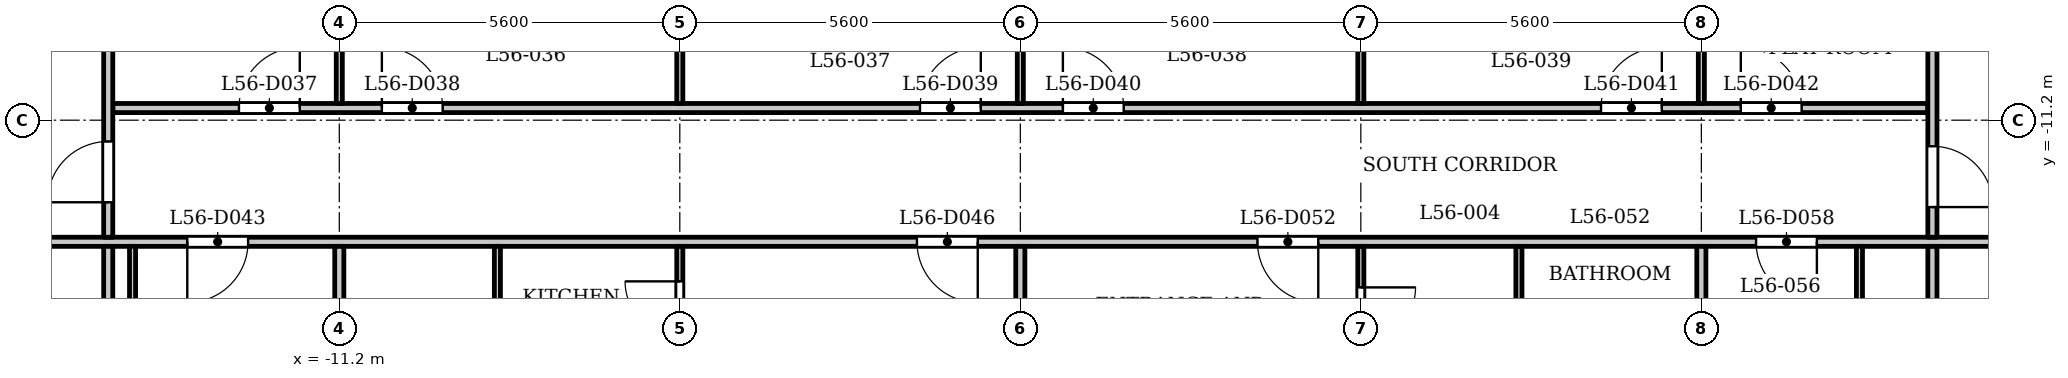
"""IFC4 building model, lengths in metres.
Left out: names, types, materials, properties, quantities, classifications, styles, units other than length and angle.
Written with IfcOpenShell. Run it as: python <this file> out.ifc"""

import sys

from ifc_helpers import new_model, si_unit, direction, frame, frame_2d, origin, place, context, subcontext, project, spatial, rectangle, extrude, element, fill, save


model = new_model("IFC4")
c1 = context("Model", 3, precision=1e-05, world=origin(), true_north=direction((0.0, 1.0)))
c2 = subcontext(c1, "Body", "Model", "MODEL_VIEW")
j1 = project(units=[si_unit("LENGTHUNIT", "METRE"), si_unit("PLANEANGLEUNIT", "RADIAN")], contexts=[c1])
p1 = place(None, origin())
s1 = spatial("IfcSite", under=j1, at=p1, CompositionType="ELEMENT")
p2 = place(p1, origin())
s2 = spatial("IfcBuilding", under=s1, at=p2, CompositionType="ELEMENT")
p3 = place(p2, frame((0.0, 0.0, 216.9)))
s3 = spatial("IfcBuildingStorey", under=s2, at=p3, CompositionType="ELEMENT", Elevation=216.9)
p4 = place(p3, frame((-17.4, -13.2, 0.0), z_axis=(0.0, 0.0, 1.0), x_axis=(1.0, 0.0, 0.0)))
e1 = element("IfcWall", 1, at=p4, inside=s3, PredefinedType="PARTITIONING", context=c2, shape_type="SweptSolid", body=[
    extrude(rectangle(XDim=34.8, YDim=0.15, at=frame_2d((17.4, 0.0))), origin(), (0.0, 0.0, 1.0), 3.2),
])
p5 = place(p4, frame((0.15, 0.0, 0.0)))
e2 = element("IfcOpeningElement", 2, at=p5, cuts=e1, PredefinedType="OPENING", context=c2, shape_type="SweptSolid", body=[
    extrude(rectangle(XDim=1.0, YDim=2.1, at=frame_2d((0.5, 1.05))), frame((0.0, 0.085, 0.0), z_axis=(0.0, -1.0, 0.0), x_axis=(1.0, 0.0, 0.0)), (0.0, 0.0, 1.0), 0.17),
])
p6 = place(p4, frame((33.55, 0.0, 0.0)))
e3 = element("IfcOpeningElement", 3, at=p6, cuts=e1, PredefinedType="OPENING", context=c2, shape_type="SweptSolid", body=[
    extrude(rectangle(XDim=1.0, YDim=2.1, at=frame_2d((0.5, 1.05))), frame((0.0, 0.085, 0.0), z_axis=(0.0, -1.0, 0.0), x_axis=(1.0, 0.0, 0.0)), (0.0, 0.0, 1.0), 0.17),
])
p7 = place(p4, frame((3.7, 0.0, 0.0)))
e4 = element("IfcOpeningElement", 4, at=p7, cuts=e1, PredefinedType="OPENING", context=c2, shape_type="SweptSolid", body=[
    extrude(rectangle(XDim=1.0, YDim=2.1, at=frame_2d((0.5, 1.05))), frame((0.0, 0.085, 0.0), z_axis=(0.0, -1.0, 0.0), x_axis=(1.0, 0.0, 0.0)), (0.0, 0.0, 1.0), 0.17),
])
p8 = place(p4, frame((15.7, 0.0, 0.0)))
e5 = element("IfcOpeningElement", 5, at=p8, cuts=e1, PredefinedType="OPENING", context=c2, shape_type="SweptSolid", body=[
    extrude(rectangle(XDim=1.0, YDim=2.1, at=frame_2d((0.5, 1.05))), frame((0.0, 0.085, 0.0), z_axis=(0.0, -1.0, 0.0), x_axis=(1.0, 0.0, 0.0)), (0.0, 0.0, 1.0), 0.17),
])
p9 = place(p4, frame((21.3, 0.0, 0.0)))
e6 = element("IfcOpeningElement", 6, at=p9, cuts=e1, PredefinedType="OPENING", context=c2, shape_type="SweptSolid", body=[
    extrude(rectangle(XDim=1.0, YDim=2.1, at=frame_2d((0.5, 1.05))), frame((0.0, 0.085, 0.0), z_axis=(0.0, -1.0, 0.0), x_axis=(1.0, 0.0, 0.0)), (0.0, 0.0, 1.0), 0.17),
])
p10 = place(p4, frame((29.5, 0.0, 0.0)))
e7 = element("IfcOpeningElement", 7, at=p10, cuts=e1, PredefinedType="OPENING", context=c2, shape_type="SweptSolid", body=[
    extrude(rectangle(XDim=1.0, YDim=2.1, at=frame_2d((0.5, 1.05))), frame((0.0, 0.085, 0.0), z_axis=(0.0, -1.0, 0.0), x_axis=(1.0, 0.0, 0.0)), (0.0, 0.0, 1.0), 0.17),
])
p11 = place(p3, frame((-14.925, -11.0, 0.0), z_axis=(0.0, 0.0, 1.0), x_axis=(1.0, 0.0, 0.0)))
e8 = element("IfcWall", 8, at=p11, inside=s3, PredefinedType="PARTITIONING", context=c2, shape_type="SweptSolid", body=[
    extrude(rectangle(XDim=29.85, YDim=0.15, at=frame_2d((14.925, 0.0))), origin(), (0.0, 0.0, 1.0), 3.2),
])
p12 = place(p11, frame((2.075, 0.0, 0.0)))
e9 = element("IfcOpeningElement", 9, at=p12, cuts=e8, PredefinedType="OPENING", context=c2, shape_type="SweptSolid", body=[
    extrude(rectangle(XDim=1.0, YDim=2.1, at=frame_2d((0.5, 1.05))), frame((0.0, 0.085, 0.0), z_axis=(0.0, -1.0, 0.0), x_axis=(1.0, 0.0, 0.0)), (0.0, 0.0, 1.0), 0.17),
])
p13 = place(p11, frame((4.425, 0.0, 0.0)))
e10 = element("IfcOpeningElement", 10, at=p13, cuts=e8, PredefinedType="OPENING", context=c2, shape_type="SweptSolid", body=[
    extrude(rectangle(XDim=1.0, YDim=2.1, at=frame_2d((0.5, 1.05))), frame((0.0, 0.085, 0.0), z_axis=(0.0, -1.0, 0.0), x_axis=(1.0, 0.0, 0.0)), (0.0, 0.0, 1.0), 0.17),
])
p14 = place(p11, frame((13.275, 0.0, 0.0)))
e11 = element("IfcOpeningElement", 11, at=p14, cuts=e8, PredefinedType="OPENING", context=c2, shape_type="SweptSolid", body=[
    extrude(rectangle(XDim=1.0, YDim=2.1, at=frame_2d((0.5, 1.05))), frame((0.0, 0.085, 0.0), z_axis=(0.0, -1.0, 0.0), x_axis=(1.0, 0.0, 0.0)), (0.0, 0.0, 1.0), 0.17),
])
p15 = place(p11, frame((15.625, 0.0, 0.0)))
e12 = element("IfcOpeningElement", 12, at=p15, cuts=e8, PredefinedType="OPENING", context=c2, shape_type="SweptSolid", body=[
    extrude(rectangle(XDim=1.0, YDim=2.1, at=frame_2d((0.5, 1.05))), frame((0.0, 0.085, 0.0), z_axis=(0.0, -1.0, 0.0), x_axis=(1.0, 0.0, 0.0)), (0.0, 0.0, 1.0), 0.17),
])
p16 = place(p11, frame((24.475, 0.0, 0.0)))
e13 = element("IfcOpeningElement", 13, at=p16, cuts=e8, PredefinedType="OPENING", context=c2, shape_type="SweptSolid", body=[
    extrude(rectangle(XDim=1.0, YDim=2.1, at=frame_2d((0.5, 1.05))), frame((0.0, 0.085, 0.0), z_axis=(0.0, -1.0, 0.0), x_axis=(1.0, 0.0, 0.0)), (0.0, 0.0, 1.0), 0.17),
])
p17 = place(p11, frame((26.774, 0.0, 0.0)))
e14 = element("IfcOpeningElement", 14, at=p17, cuts=e8, PredefinedType="OPENING", context=c2, shape_type="SweptSolid", body=[
    extrude(rectangle(XDim=1.0, YDim=2.1, at=frame_2d((0.5, 1.05))), frame((0.0, 0.085, 0.0), z_axis=(0.0, -1.0, 0.0), x_axis=(1.0, 0.0, 0.0)), (0.0, 0.0, 1.0), 0.17),
])
p18 = place(p3, frame((-15.0, -15.325, 0.0), z_axis=(0.0, 0.0, 1.0), x_axis=(0.0, 1.0, 0.0)))
e15 = element("IfcWall", 15, at=p18, inside=s3, PredefinedType="PARTITIONING", context=c2, shape_type="SweptSolid", body=[
    extrude(rectangle(XDim=2.05, YDim=0.15, at=frame_2d((1.025, 0.0))), origin(), (0.0, 0.0, 1.0), 3.2),
])
p19 = place(p3, frame((-15.0, -13.125, 0.0), z_axis=(0.0, 0.0, 1.0), x_axis=(0.0, 1.0, 0.0)))
e16 = element("IfcWall", 16, at=p19, inside=s3, PredefinedType="PARTITIONING", context=c2, shape_type="SweptSolid", body=[
    extrude(rectangle(XDim=6.356, YDim=0.15, at=frame_2d((3.178, 0.0))), origin(), (0.0, 0.0, 1.0), 3.2),
])
p20 = place(p19, frame((0.575, 0.0, 0.0)))
e17 = element("IfcOpeningElement", 17, at=p20, cuts=e16, PredefinedType="OPENING", context=c2, shape_type="SweptSolid", body=[
    extrude(rectangle(XDim=1.0, YDim=2.1, at=frame_2d((0.5, 1.05))), frame((0.0, 0.085, 0.0), z_axis=(0.0, -1.0, 0.0), x_axis=(1.0, 0.0, 0.0)), (0.0, 0.0, 1.0), 0.17),
])
p21 = place(p3, frame((-14.6, -16.45, 0.0), z_axis=(0.0, 0.0, 1.0), x_axis=(0.0, 1.0, 0.0)))
e18 = element("IfcWall", 18, at=p21, inside=s3, PredefinedType="PARTITIONING", context=c2, shape_type="SweptSolid", body=[
    extrude(rectangle(XDim=3.175, YDim=0.1, at=frame_2d((1.587, 0.0))), origin(), (0.0, 0.0, 1.0), 3.2),
])
p22 = place(p3, frame((-11.2, -10.925, 0.0), z_axis=(0.0, 0.0, 1.0), x_axis=(0.0, 1.0, 0.0)))
e19 = element("IfcWall", 19, at=p22, inside=s3, PredefinedType="PARTITIONING", context=c2, shape_type="SweptSolid", body=[
    extrude(rectangle(XDim=3.605, YDim=0.1, at=frame_2d((1.802, 0.0))), origin(), (0.0, 0.0, 1.0), 3.2),
])
p23 = place(p3, frame((-11.2, -16.45, 0.0), z_axis=(0.0, 0.0, 1.0), x_axis=(0.0, 1.0, 0.0)))
e20 = element("IfcWall", 20, at=p23, inside=s3, PredefinedType="PARTITIONING", context=c2, shape_type="SweptSolid", body=[
    extrude(rectangle(XDim=3.175, YDim=0.15, at=frame_2d((1.587, 0.0))), origin(), (0.0, 0.0, 1.0), 3.2),
])
p24 = place(p3, frame((-8.6, -16.45, 0.0), z_axis=(0.0, 0.0, 1.0), x_axis=(0.0, 1.0, 0.0)))
e21 = element("IfcWall", 21, at=p24, inside=s3, PredefinedType="PARTITIONING", context=c2, shape_type="SweptSolid", body=[
    extrude(rectangle(XDim=3.175, YDim=0.1, at=frame_2d((1.587, 0.0))), origin(), (0.0, 0.0, 1.0), 3.2),
])
p25 = place(p3, frame((-5.6, -16.45, 0.0), z_axis=(0.0, 0.0, 1.0), x_axis=(0.0, 1.0, 0.0)))
e22 = element("IfcWall", 22, at=p25, inside=s3, PredefinedType="PARTITIONING", context=c2, shape_type="SweptSolid", body=[
    extrude(rectangle(XDim=3.175, YDim=0.1, at=frame_2d((1.587, 0.0))), origin(), (0.0, 0.0, 1.0), 3.2),
])
p26 = place(p25, frame((1.699, 0.0, 0.0)))
e23 = element("IfcOpeningElement", 23, at=p26, cuts=e22, PredefinedType="OPENING", context=c2, shape_type="SweptSolid", body=[
    extrude(rectangle(XDim=0.9, YDim=2.1, at=frame_2d((0.45, 1.05))), frame((0.0, 0.06, 0.0), z_axis=(0.0, -1.0, 0.0), x_axis=(1.0, 0.0, 0.0)), (0.0, 0.0, 1.0), 0.12),
])
for number, where, z_axis, x_axis in (
    (24, (-5.6, -10.925, 0.0), (0.0, 0.0, 1.0), (0.0, 1.0, 0.0)),
    (25, (0.0, -10.925, 0.0), (0.0, 0.0, 1.0), (0.0, 1.0, 0.0)),
):
    element("IfcWall", number, at=place(p3, frame(where, z_axis=z_axis, x_axis=x_axis)), inside=s3, PredefinedType="PARTITIONING", context=c2, shape_type="SweptSolid", body=[
        extrude(rectangle(XDim=3.605, YDim=0.1, at=frame_2d((1.802, 0.0))), origin(), (0.0, 0.0, 1.0), 3.2),
    ])
p27 = place(p3, frame((0.0, -16.45, 0.0), z_axis=(0.0, 0.0, 1.0), x_axis=(0.0, 1.0, 0.0)))
e26 = element("IfcWall", 26, at=p27, inside=s3, PredefinedType="PARTITIONING", context=c2, shape_type="SweptSolid", body=[
    extrude(rectangle(XDim=3.175, YDim=0.15, at=frame_2d((1.587, 0.0))), origin(), (0.0, 0.0, 1.0), 3.2),
])
p28 = place(p3, frame((5.6, -16.45, 0.0), z_axis=(0.0, 0.0, 1.0), x_axis=(0.0, 1.0, 0.0)))
e27 = element("IfcWall", 27, at=p28, inside=s3, PredefinedType="PARTITIONING", context=c2, shape_type="SweptSolid", body=[
    extrude(rectangle(XDim=3.175, YDim=0.1, at=frame_2d((1.587, 0.0))), origin(), (0.0, 0.0, 1.0), 3.2),
])
p29 = place(p28, frame((1.6, 0.0, 0.0)))
e28 = element("IfcOpeningElement", 28, at=p29, cuts=e27, PredefinedType="OPENING", context=c2, shape_type="SweptSolid", body=[
    extrude(rectangle(XDim=0.9, YDim=2.1, at=frame_2d((0.45, 1.05))), frame((0.0, 0.06, 0.0), z_axis=(0.0, -1.0, 0.0), x_axis=(1.0, 0.0, 0.0)), (0.0, 0.0, 1.0), 0.12),
])
p30 = place(p3, frame((5.6, -10.925, 0.0), z_axis=(0.0, 0.0, 1.0), x_axis=(0.0, 1.0, 0.0)))
e29 = element("IfcWall", 29, at=p30, inside=s3, PredefinedType="PARTITIONING", context=c2, shape_type="SweptSolid", body=[
    extrude(rectangle(XDim=3.605, YDim=0.1, at=frame_2d((1.802, 0.0))), origin(), (0.0, 0.0, 1.0), 3.2),
])
p31 = place(p3, frame((8.2, -16.45, 0.0), z_axis=(0.0, 0.0, 1.0), x_axis=(0.0, 1.0, 0.0)))
e30 = element("IfcWall", 30, at=p31, inside=s3, PredefinedType="PARTITIONING", context=c2, shape_type="SweptSolid", body=[
    extrude(rectangle(XDim=3.175, YDim=0.1, at=frame_2d((1.587, 0.0))), origin(), (0.0, 0.0, 1.0), 3.2),
])
p32 = place(p3, frame((11.2, -10.925, 0.0), z_axis=(0.0, 0.0, 1.0), x_axis=(0.0, 1.0, 0.0)))
e31 = element("IfcWall", 31, at=p32, inside=s3, PredefinedType="PARTITIONING", context=c2, shape_type="SweptSolid", body=[
    extrude(rectangle(XDim=3.605, YDim=0.1, at=frame_2d((1.802, 0.0))), origin(), (0.0, 0.0, 1.0), 3.2),
])
p33 = place(p3, frame((11.2, -16.45, 0.0), z_axis=(0.0, 0.0, 1.0), x_axis=(0.0, 1.0, 0.0)))
e32 = element("IfcWall", 32, at=p33, inside=s3, PredefinedType="PARTITIONING", context=c2, shape_type="SweptSolid", body=[
    extrude(rectangle(XDim=3.175, YDim=0.15, at=frame_2d((1.587, 0.0))), origin(), (0.0, 0.0, 1.0), 3.2),
])
p34 = place(p3, frame((13.8, -16.45, 0.0), z_axis=(0.0, 0.0, 1.0), x_axis=(0.0, 1.0, 0.0)))
e33 = element("IfcWall", 33, at=p34, inside=s3, PredefinedType="PARTITIONING", context=c2, shape_type="SweptSolid", body=[
    extrude(rectangle(XDim=3.175, YDim=0.1, at=frame_2d((1.587, 0.0))), origin(), (0.0, 0.0, 1.0), 3.2),
])
p35 = place(p3, frame((15.0, -15.325, 0.0), z_axis=(0.0, 0.0, 1.0), x_axis=(0.0, 1.0, 0.0)))
e34 = element("IfcWall", 34, at=p35, inside=s3, PredefinedType="PARTITIONING", context=c2, shape_type="SweptSolid", body=[
    extrude(rectangle(XDim=2.05, YDim=0.15, at=frame_2d((1.025, 0.0))), origin(), (0.0, 0.0, 1.0), 3.2),
])
p36 = place(p3, frame((15.0, -13.125, 0.0), z_axis=(0.0, 0.0, 1.0), x_axis=(0.0, 1.0, 0.0)))
e35 = element("IfcWall", 35, at=p36, inside=s3, PredefinedType="PARTITIONING", context=c2, shape_type="SweptSolid", body=[
    extrude(rectangle(XDim=6.356, YDim=0.15, at=frame_2d((3.178, 0.0))), origin(), (0.0, 0.0, 1.0), 3.2),
])
p37 = place(p36, frame((0.496, 0.0, 0.0)))
e36 = element("IfcOpeningElement", 36, at=p37, cuts=e35, PredefinedType="OPENING", context=c2, shape_type="SweptSolid", body=[
    extrude(rectangle(XDim=1.0, YDim=2.1, at=frame_2d((0.5, 1.05))), frame((0.0, 0.085, 0.0), z_axis=(0.0, -1.0, 0.0), x_axis=(1.0, 0.0, 0.0)), (0.0, 0.0, 1.0), 0.17),
])
p38 = place(p20, origin())
e37 = element("IfcDoor", 37, at=p38, inside=s3, OperationType="SINGLE_SWING_RIGHT", PredefinedType="DOOR", context=c2, shape_type="SweptSolid", body=[
    extrude(rectangle(XDim=1.0, YDim=2.1, at=frame_2d((0.5, 1.05))), frame((0.0, 0.025, 0.0), z_axis=(0.0, -1.0, 0.0), x_axis=(1.0, 0.0, 0.0)), (0.0, 0.0, 1.0), 0.05),
])
fill(e17, e37)
p39 = place(p37, origin())
e38 = element("IfcDoor", 38, at=p39, inside=s3, OperationType="SINGLE_SWING_LEFT", PredefinedType="DOOR", context=c2, shape_type="SweptSolid", body=[
    extrude(rectangle(XDim=1.0, YDim=2.1, at=frame_2d((0.5, 1.05))), frame((0.0, 0.025, 0.0), z_axis=(0.0, -1.0, 0.0), x_axis=(1.0, 0.0, 0.0)), (0.0, 0.0, 1.0), 0.05),
])
fill(e36, e38)
p40 = place(p12, origin())
e39 = element("IfcDoor", 39, at=p40, inside=s3, OperationType="SINGLE_SWING_LEFT", PredefinedType="DOOR", context=c2, shape_type="SweptSolid", body=[
    extrude(rectangle(XDim=1.0, YDim=2.1, at=frame_2d((0.5, 1.05))), frame((0.0, 0.025, 0.0), z_axis=(0.0, -1.0, 0.0), x_axis=(1.0, 0.0, 0.0)), (0.0, 0.0, 1.0), 0.05),
])
fill(e9, e39)
p41 = place(p13, origin())
e40 = element("IfcDoor", 40, at=p41, inside=s3, OperationType="SINGLE_SWING_RIGHT", PredefinedType="DOOR", context=c2, shape_type="SweptSolid", body=[
    extrude(rectangle(XDim=1.0, YDim=2.1, at=frame_2d((0.5, 1.05))), frame((0.0, 0.025, 0.0), z_axis=(0.0, -1.0, 0.0), x_axis=(1.0, 0.0, 0.0)), (0.0, 0.0, 1.0), 0.05),
])
fill(e10, e40)
p42 = place(p14, origin())
e41 = element("IfcDoor", 41, at=p42, inside=s3, OperationType="SINGLE_SWING_LEFT", PredefinedType="DOOR", context=c2, shape_type="SweptSolid", body=[
    extrude(rectangle(XDim=1.0, YDim=2.1, at=frame_2d((0.5, 1.05))), frame((0.0, 0.025, 0.0), z_axis=(0.0, -1.0, 0.0), x_axis=(1.0, 0.0, 0.0)), (0.0, 0.0, 1.0), 0.05),
])
fill(e11, e41)
p43 = place(p15, origin())
e42 = element("IfcDoor", 42, at=p43, inside=s3, OperationType="SINGLE_SWING_RIGHT", PredefinedType="DOOR", context=c2, shape_type="SweptSolid", body=[
    extrude(rectangle(XDim=1.0, YDim=2.1, at=frame_2d((0.5, 1.05))), frame((0.0, 0.025, 0.0), z_axis=(0.0, -1.0, 0.0), x_axis=(1.0, 0.0, 0.0)), (0.0, 0.0, 1.0), 0.05),
])
fill(e12, e42)
p44 = place(p16, origin())
e43 = element("IfcDoor", 43, at=p44, inside=s3, OperationType="SINGLE_SWING_LEFT", PredefinedType="DOOR", context=c2, shape_type="SweptSolid", body=[
    extrude(rectangle(XDim=1.0, YDim=2.1, at=frame_2d((0.5, 1.05))), frame((0.0, 0.025, 0.0), z_axis=(0.0, -1.0, 0.0), x_axis=(1.0, 0.0, 0.0)), (0.0, 0.0, 1.0), 0.05),
])
fill(e13, e43)
p45 = place(p17, origin())
e44 = element("IfcDoor", 44, at=p45, inside=s3, OperationType="SINGLE_SWING_RIGHT", PredefinedType="DOOR", context=c2, shape_type="SweptSolid", body=[
    extrude(rectangle(XDim=1.0, YDim=2.1, at=frame_2d((0.5, 1.05))), frame((0.0, 0.025, 0.0), z_axis=(0.0, -1.0, 0.0), x_axis=(1.0, 0.0, 0.0)), (0.0, 0.0, 1.0), 0.05),
])
fill(e14, e44)
p46 = place(p7, origin())
e45 = element("IfcDoor", 45, at=p46, inside=s3, OperationType="SINGLE_SWING_LEFT", PredefinedType="DOOR", context=c2, shape_type="SweptSolid", body=[
    extrude(rectangle(XDim=1.0, YDim=2.1, at=frame_2d((0.5, 1.05))), frame((0.0, 0.025, 0.0), z_axis=(0.0, -1.0, 0.0), x_axis=(1.0, 0.0, 0.0)), (0.0, 0.0, 1.0), 0.05),
])
fill(e4, e45)
p47 = place(p8, origin())
e46 = element("IfcDoor", 46, at=p47, inside=s3, OperationType="SINGLE_SWING_RIGHT", PredefinedType="DOOR", context=c2, shape_type="SweptSolid", body=[
    extrude(rectangle(XDim=1.0, YDim=2.1, at=frame_2d((0.5, 1.05))), frame((0.0, 0.025, 0.0), z_axis=(0.0, -1.0, 0.0), x_axis=(1.0, 0.0, 0.0)), (0.0, 0.0, 1.0), 0.05),
])
fill(e5, e46)
p48 = place(p26, origin())
e47 = element("IfcDoor", 47, at=p48, inside=s3, OperationType="SINGLE_SWING_LEFT", PredefinedType="DOOR", context=c2, shape_type="SweptSolid", body=[
    extrude(rectangle(XDim=0.9, YDim=2.1, at=frame_2d((0.45, 1.05))), frame((0.0, 0.025, 0.0), z_axis=(0.0, -1.0, 0.0), x_axis=(1.0, 0.0, 0.0)), (0.0, 0.0, 1.0), 0.05),
])
fill(e23, e47)
p49 = place(p9, origin())
e48 = element("IfcDoor", 48, at=p49, inside=s3, OperationType="SINGLE_SWING_RIGHT", PredefinedType="DOOR", context=c2, shape_type="SweptSolid", body=[
    extrude(rectangle(XDim=1.0, YDim=2.1, at=frame_2d((0.5, 1.05))), frame((0.0, 0.025, 0.0), z_axis=(0.0, -1.0, 0.0), x_axis=(1.0, 0.0, 0.0)), (0.0, 0.0, 1.0), 0.05),
])
fill(e6, e48)
p50 = place(p29, origin())
e49 = element("IfcDoor", 49, at=p50, inside=s3, OperationType="SINGLE_SWING_RIGHT", PredefinedType="DOOR", context=c2, shape_type="SweptSolid", body=[
    extrude(rectangle(XDim=0.9, YDim=2.1, at=frame_2d((0.45, 1.05))), frame((0.0, 0.025, 0.0), z_axis=(0.0, -1.0, 0.0), x_axis=(1.0, 0.0, 0.0)), (0.0, 0.0, 1.0), 0.05),
])
fill(e28, e49)
p51 = place(p10, origin())
e50 = element("IfcDoor", 50, at=p51, inside=s3, OperationType="SINGLE_SWING_RIGHT", PredefinedType="DOOR", context=c2, shape_type="SweptSolid", body=[
    extrude(rectangle(XDim=1.0, YDim=2.1, at=frame_2d((0.5, 1.05))), frame((0.0, 0.025, 0.0), z_axis=(0.0, -1.0, 0.0), x_axis=(1.0, 0.0, 0.0)), (0.0, 0.0, 1.0), 0.05),
])
fill(e7, e50)
save(model, sys.argv[1])
